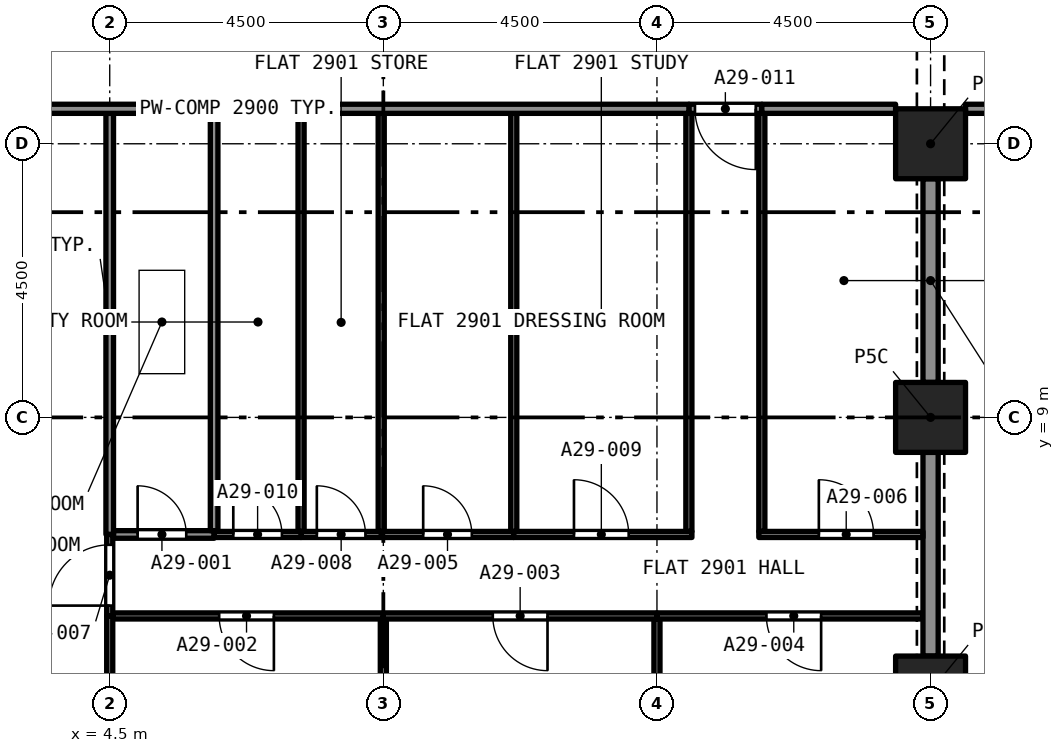
"""IFC4 building model, lengths in metres.
Left out: names, types, materials, properties, quantities, classifications, styles, units other than length and angle.
Written with IfcOpenShell. Run it as: python <this file> out.ifc"""

import sys

from ifc_helpers import new_model, si_unit, direction, frame, frame_2d, origin, origin_2d, place, context, subcontext, project, spatial, rectangle, extrude, element, fill, save


model = new_model("IFC4")
c1 = context("Model", 3, precision=1e-05, world=origin(), true_north=direction((0.0, 1.0)))
c2 = subcontext(c1, "Body", "Model", "MODEL_VIEW")
j1 = project(units=[si_unit("LENGTHUNIT", "METRE"), si_unit("PLANEANGLEUNIT", "RADIAN")], contexts=[c1])
p1 = place(None, origin())
s1 = spatial("IfcSite", under=j1, at=p1, CompositionType="ELEMENT")
p2 = place(p1, origin())
s2 = spatial("IfcBuilding", under=s1, at=p2, CompositionType="ELEMENT")
p3 = place(p2, frame((0.0, 0.0, 105.6)))
s3 = spatial("IfcBuildingStorey", under=s2, at=p3, CompositionType="ELEMENT", Elevation=105.6)
for number, where, z_axis, x_axis in (
    (1, (18.0, 4.5, 0.0), (0.0, 0.0, 1.0), (1.0, 0.0, 0.0)),
    (2, (18.0, 9.0, 0.0), (0.0, 0.0, 1.0), (1.0, 0.0, 0.0)),
    (3, (18.0, 13.5, 0.0), (0.0, 0.0, 1.0), (1.0, 0.0, 0.0)),
):
    element("IfcColumn", number, at=place(p3, frame(where, z_axis=z_axis, x_axis=x_axis)), inside=s3, PredefinedType="COLUMN", context=c2, shape_type="SweptSolid", body=[
        extrude(rectangle(XDim=1.15, YDim=1.15, at=origin_2d()), origin(), (0.0, 0.0, 1.0), 3.2),
    ])
p4 = place(p3, frame((4.562, 7.075, 0.0), z_axis=(0.0, 0.0, 1.0), x_axis=(1.0, 0.0, 0.0)))
e4 = element("IfcWall", 4, at=p4, inside=s3, PredefinedType="PARTITIONING", context=c2, shape_type="SweptSolid", body=[
    extrude(rectangle(XDim=1.655, YDim=0.125, at=frame_2d((0.827, 0.0))), origin(), (0.0, 0.0, 1.0), 2.9),
])
p5 = place(p4, frame((0.396, 0.0, 0.0)))
e5 = element("IfcOpeningElement", 5, at=p5, cuts=e4, PredefinedType="OPENING", context=c2, shape_type="SweptSolid", body=[
    extrude(rectangle(XDim=0.8, YDim=2.1, at=frame_2d((0.4, 1.05))), frame((0.0, 0.073, 0.0), z_axis=(0.0, -1.0, 0.0), x_axis=(1.0, 0.0, 0.0)), (0.0, 0.0, 1.0), 0.145),
])
p6 = place(p3, frame((4.5, 7.075, 0.0), z_axis=(0.0, 0.0, 1.0), x_axis=(0.0, 1.0, 0.0)))
e6 = element("IfcWall", 6, at=p6, inside=s3, PredefinedType="PARTITIONING", context=c2, shape_type="SweptSolid", body=[
    extrude(rectangle(XDim=6.925, YDim=0.125, at=frame_2d((3.462, 0.0))), origin(), (0.0, 0.0, 1.0), 2.9),
])
p7 = place(p3, frame((6.217, 7.137, 0.0), z_axis=(0.0, 0.0, 1.0), x_axis=(0.0, 1.0, 0.0)))
e7 = element("IfcWall", 7, at=p7, inside=s3, PredefinedType="PARTITIONING", context=c2, shape_type="SweptSolid", body=[
    extrude(rectangle(XDim=6.863, YDim=0.125, at=frame_2d((3.431, 0.0))), origin(), (0.0, 0.0, 1.0), 2.9),
])
p8 = place(p3, frame((9.0, 0.575, 0.0), z_axis=(0.0, 0.0, 1.0), x_axis=(0.0, 1.0, 0.0)))
e8 = element("IfcWall", 8, at=p8, inside=s3, PredefinedType="PARTITIONING", context=c2, shape_type="SweptSolid", body=[
    extrude(rectangle(XDim=5.11, YDim=0.1, at=frame_2d((2.555, 0.0))), origin(), (0.0, 0.0, 1.0), 2.9),
])
p9 = place(p3, frame((9.0, 5.735, 0.0), z_axis=(0.0, 0.0, 1.0), x_axis=(-1.0, 0.0, 0.0)))
e9 = element("IfcWall", 9, at=p9, inside=s3, PredefinedType="PARTITIONING", context=c2, shape_type="SweptSolid", body=[
    extrude(rectangle(XDim=4.45, YDim=0.1, at=frame_2d((2.225, 0.0))), origin(), (0.0, 0.0, 1.0), 2.9),
])
p10 = place(p9, frame((1.8, 0.0, 0.0)))
e10 = element("IfcOpeningElement", 10, at=p10, cuts=e9, PredefinedType="OPENING", context=c2, shape_type="SweptSolid", body=[
    extrude(rectangle(XDim=0.9, YDim=2.1, at=frame_2d((0.45, 1.05))), frame((0.0, 0.06, 0.0), z_axis=(0.0, -1.0, 0.0), x_axis=(1.0, 0.0, 0.0)), (0.0, 0.0, 1.0), 0.12),
])
p11 = place(p3, frame((4.5, 0.622, 0.0), z_axis=(0.0, 0.0, 1.0), x_axis=(0.0, 1.0, 0.0)))
e11 = element("IfcWall", 11, at=p11, inside=s3, PredefinedType="PARTITIONING", context=c2, shape_type="SweptSolid", body=[
    extrude(rectangle(XDim=5.113, YDim=0.1, at=frame_2d((2.556, 0.0))), origin(), (0.0, 0.0, 1.0), 2.9),
])
p12 = place(p3, frame((13.5, 0.575, 0.0), z_axis=(0.0, 0.0, 1.0), x_axis=(0.0, 1.0, 0.0)))
e12 = element("IfcWall", 12, at=p12, inside=s3, PredefinedType="PARTITIONING", context=c2, shape_type="SweptSolid", body=[
    extrude(rectangle(XDim=5.11, YDim=0.1, at=frame_2d((2.555, 0.0))), origin(), (0.0, 0.0, 1.0), 2.9),
])
p13 = place(p3, frame((13.5, 5.735, 0.0), z_axis=(0.0, 0.0, 1.0), x_axis=(-1.0, 0.0, 0.0)))
e13 = element("IfcWall", 13, at=p13, inside=s3, PredefinedType="PARTITIONING", context=c2, shape_type="SweptSolid", body=[
    extrude(rectangle(XDim=4.5, YDim=0.1, at=frame_2d((2.25, 0.0))), origin(), (0.0, 0.0, 1.0), 2.9),
])
p14 = place(p13, frame((1.8, 0.0, 0.0)))
e14 = element("IfcOpeningElement", 14, at=p14, cuts=e13, PredefinedType="OPENING", context=c2, shape_type="SweptSolid", body=[
    extrude(rectangle(XDim=0.9, YDim=2.1, at=frame_2d((0.45, 1.05))), frame((0.0, 0.06, 0.0), z_axis=(0.0, -1.0, 0.0), x_axis=(1.0, 0.0, 0.0)), (0.0, 0.0, 1.0), 0.12),
])
p15 = place(p3, frame((17.875, 5.735, 0.0), z_axis=(0.0, 0.0, 1.0), x_axis=(-1.0, 0.0, 0.0)))
e15 = element("IfcWall", 15, at=p15, inside=s3, PredefinedType="PARTITIONING", context=c2, shape_type="SweptSolid", body=[
    extrude(rectangle(XDim=4.375, YDim=0.1, at=frame_2d((2.188, 0.0))), origin(), (0.0, 0.0, 1.0), 2.9),
])
p16 = place(p15, frame((1.675, 0.0, 0.0)))
e16 = element("IfcOpeningElement", 16, at=p16, cuts=e15, PredefinedType="OPENING", context=c2, shape_type="SweptSolid", body=[
    extrude(rectangle(XDim=0.9, YDim=2.1, at=frame_2d((0.45, 1.05))), frame((0.0, 0.06, 0.0), z_axis=(0.0, -1.0, 0.0), x_axis=(1.0, 0.0, 0.0)), (0.0, 0.0, 1.0), 0.12),
])
p17 = place(p3, frame((18.0, 5.075, 0.0), z_axis=(0.0, 0.0, 1.0), x_axis=(0.0, 1.0, 0.0)))
e17 = element("IfcWall", 17, at=p17, inside=s3, PredefinedType="PARTITIONING", context=c2, shape_type="SweptSolid", body=[
    extrude(rectangle(XDim=3.35, YDim=0.25, at=frame_2d((1.675, 0.0))), origin(), (0.0, 0.0, 1.0), 2.38),
])
p18 = place(p3, frame((8.965, 7.075, 0.0), z_axis=(0.0, 0.0, 1.0), x_axis=(1.0, 0.0, 0.0)))
e18 = element("IfcWall", 18, at=p18, inside=s3, PredefinedType="PARTITIONING", context=c2, shape_type="SweptSolid", body=[
    extrude(rectangle(XDim=2.18, YDim=0.1, at=frame_2d((1.09, 0.0))), origin(), (0.0, 0.0, 1.0), 2.9),
])
p19 = place(p18, frame((0.69, 0.0, 0.0)))
e19 = element("IfcOpeningElement", 19, at=p19, cuts=e18, PredefinedType="OPENING", context=c2, shape_type="SweptSolid", body=[
    extrude(rectangle(XDim=0.8, YDim=2.1, at=frame_2d((0.4, 1.05))), frame((0.0, 0.06, 0.0), z_axis=(0.0, -1.0, 0.0), x_axis=(1.0, 0.0, 0.0)), (0.0, 0.0, 1.0), 0.12),
])
for number, where, z_axis, x_axis in (
    (20, (8.965, 7.125, 0.0), (0.0, 0.0, 1.0), (0.0, 1.0, 0.0)),
    (21, (11.145, 7.125, 0.0), (0.0, 0.0, 1.0), (0.0, 1.0, 0.0)),
    (22, (15.225, 7.125, 0.0), (0.0, 0.0, 1.0), (0.0, 1.0, 0.0)),
):
    element("IfcWall", number, at=place(p3, frame(where, z_axis=z_axis, x_axis=x_axis)), inside=s3, PredefinedType="PARTITIONING", context=c2, shape_type="SweptSolid", body=[
        extrude(rectangle(XDim=6.875, YDim=0.1, at=frame_2d((3.438, 0.0))), origin(), (0.0, 0.0, 1.0), 2.9),
    ])
p20 = place(p3, frame((15.175, 7.075, 0.0), z_axis=(0.0, 0.0, 1.0), x_axis=(1.0, 0.0, 0.0)))
e23 = element("IfcWall", 23, at=p20, inside=s3, PredefinedType="PARTITIONING", context=c2, shape_type="SweptSolid", body=[
    extrude(rectangle(XDim=2.7, YDim=0.1, at=frame_2d((1.35, 0.0))), origin(), (0.0, 0.0, 1.0), 2.9),
])
p21 = place(p20, frame((0.988, 0.0, 0.0)))
e24 = element("IfcOpeningElement", 24, at=p21, cuts=e23, PredefinedType="OPENING", context=c2, shape_type="SweptSolid", body=[
    extrude(rectangle(XDim=0.9, YDim=2.1, at=frame_2d((0.45, 1.05))), frame((0.0, 0.06, 0.0), z_axis=(0.0, -1.0, 0.0), x_axis=(1.0, 0.0, 0.0)), (0.0, 0.0, 1.0), 0.12),
])
p22 = place(p3, frame((4.5, 5.735, 0.0), z_axis=(0.0, 0.0, 1.0), x_axis=(0.0, 1.0, 0.0)))
e25 = element("IfcWall", 25, at=p22, inside=s3, PredefinedType="PARTITIONING", context=c2, shape_type="SweptSolid", body=[
    extrude(rectangle(XDim=1.34, YDim=0.1, at=frame_2d((0.67, 0.0))), origin(), (0.0, 0.0, 1.0), 2.9),
])
p23 = place(p22, frame((0.17, 0.0, 0.0)))
e26 = element("IfcOpeningElement", 26, at=p23, cuts=e25, PredefinedType="OPENING", context=c2, shape_type="SweptSolid", body=[
    extrude(rectangle(XDim=1.0, YDim=2.1, at=frame_2d((0.5, 1.05))), frame((0.0, 0.06, 0.0), z_axis=(0.0, -1.0, 0.0), x_axis=(1.0, 0.0, 0.0)), (0.0, 0.0, 1.0), 0.12),
])
p24 = place(p3, frame((7.647, 7.075, 0.0), z_axis=(0.0, 0.0, 1.0), x_axis=(1.0, 0.0, 0.0)))
e27 = element("IfcWall", 27, at=p24, inside=s3, PredefinedType="PARTITIONING", context=c2, shape_type="SweptSolid", body=[
    extrude(rectangle(XDim=1.318, YDim=0.1, at=frame_2d((0.659, 0.0))), origin(), (0.0, 0.0, 1.0), 2.9),
])
p25 = place(p24, frame((0.259, 0.0, 0.0)))
e28 = element("IfcOpeningElement", 28, at=p25, cuts=e27, PredefinedType="OPENING", context=c2, shape_type="SweptSolid", body=[
    extrude(rectangle(XDim=0.8, YDim=2.1, at=frame_2d((0.4, 1.05))), frame((0.0, 0.06, 0.0), z_axis=(0.0, -1.0, 0.0), x_axis=(1.0, 0.0, 0.0)), (0.0, 0.0, 1.0), 0.12),
])
p26 = place(p3, frame((11.145, 7.075, 0.0), z_axis=(0.0, 0.0, 1.0), x_axis=(1.0, 0.0, 0.0)))
e29 = element("IfcWall", 29, at=p26, inside=s3, PredefinedType="PARTITIONING", context=c2, shape_type="SweptSolid", body=[
    extrude(rectangle(XDim=2.93, YDim=0.1, at=frame_2d((1.465, 0.0))), origin(), (0.0, 0.0, 1.0), 2.9),
])
p27 = place(p26, frame((0.99, 0.0, 0.0)))
e30 = element("IfcOpeningElement", 30, at=p27, cuts=e29, PredefinedType="OPENING", context=c2, shape_type="SweptSolid", body=[
    extrude(rectangle(XDim=0.9, YDim=2.1, at=frame_2d((0.45, 1.05))), frame((0.0, 0.06, 0.0), z_axis=(0.0, -1.0, 0.0), x_axis=(1.0, 0.0, 0.0)), (0.0, 0.0, 1.0), 0.12),
])
p28 = place(p3, frame((14.025, 7.125, 0.0), z_axis=(0.0, 0.0, 1.0), x_axis=(0.0, 1.0, 0.0)))
e31 = element("IfcWall", 31, at=p28, inside=s3, PredefinedType="PARTITIONING", context=c2, shape_type="SweptSolid", body=[
    extrude(rectangle(XDim=6.875, YDim=0.1, at=frame_2d((3.438, 0.0))), origin(), (0.0, 0.0, 1.0), 2.9),
])
p29 = place(p3, frame((6.217, 7.075, 0.0), z_axis=(0.0, 0.0, 1.0), x_axis=(1.0, 0.0, 0.0)))
e32 = element("IfcWall", 32, at=p29, inside=s3, PredefinedType="PARTITIONING", context=c2, shape_type="SweptSolid", body=[
    extrude(rectangle(XDim=1.43, YDim=0.1, at=frame_2d((0.715, 0.0))), origin(), (0.0, 0.0, 1.0), 2.9),
])
p30 = place(p29, frame((0.315, 0.0, 0.0)))
e33 = element("IfcOpeningElement", 33, at=p30, cuts=e32, PredefinedType="OPENING", context=c2, shape_type="SweptSolid", body=[
    extrude(rectangle(XDim=0.8, YDim=2.1, at=frame_2d((0.4, 1.05))), frame((0.0, 0.06, 0.0), z_axis=(0.0, -1.0, 0.0), x_axis=(1.0, 0.0, 0.0)), (0.0, 0.0, 1.0), 0.12),
])
p31 = place(p3, frame((15.225, 14.075, 0.0), z_axis=(0.0, 0.0, 1.0), x_axis=(-1.0, 0.0, 0.0)))
e34 = element("IfcWall", 34, at=p31, inside=s3, PredefinedType="PARTITIONING", context=c2, shape_type="SweptSolid", body=[
    extrude(rectangle(XDim=1.2, YDim=0.15, at=frame_2d((0.6, 0.0))), origin(), (0.0, 0.0, 1.0), 2.9),
])
p32 = place(p31, frame((0.1, 0.0, 0.0)))
e35 = element("IfcOpeningElement", 35, at=p32, cuts=e34, PredefinedType="OPENING", context=c2, shape_type="SweptSolid", body=[
    extrude(rectangle(XDim=1.0, YDim=2.1, at=frame_2d((0.5, 1.05))), frame((0.0, 0.085, 0.0), z_axis=(0.0, -1.0, 0.0), x_axis=(1.0, 0.0, 0.0)), (0.0, 0.0, 1.0), 0.17),
])
p33 = place(p3, frame((18.0, 9.575, 0.0), z_axis=(0.0, 0.0, 1.0), x_axis=(0.0, 1.0, 0.0)))
e36 = element("IfcWall", 36, at=p33, inside=s3, PredefinedType="PARTITIONING", context=c2, shape_type="SweptSolid", body=[
    extrude(rectangle(XDim=3.35, YDim=0.25, at=frame_2d((1.675, 0.0))), origin(), (0.0, 0.0, 1.0), 2.38),
])
p34 = place(p3, frame((15.225, 14.075, 0.0), z_axis=(0.0, 0.0, 1.0), x_axis=(1.0, 0.0, 0.0)))
e37 = element("IfcWall", 37, at=p34, inside=s3, PredefinedType="PARTITIONING", context=c2, shape_type="SweptSolid", body=[
    extrude(rectangle(XDim=2.2, YDim=0.15, at=frame_2d((1.1, 0.0))), origin(), (0.0, 0.0, 1.0), 2.9),
])
p35 = place(p3, frame((0.575, 14.075, 0.0), z_axis=(0.0, 0.0, 1.0), x_axis=(1.0, 0.0, 0.0)))
e38 = element("IfcWall", 38, at=p35, inside=s3, PredefinedType="PARTITIONING", context=c2, shape_type="SweptSolid", body=[
    extrude(rectangle(XDim=13.45, YDim=0.15, at=frame_2d((6.725, 0.0))), origin(), (0.0, 0.0, 1.0), 2.9),
])
p36 = place(p3, frame((7.647, 7.125, 0.0), z_axis=(0.0, 0.0, 1.0), x_axis=(0.0, 1.0, 0.0)))
e39 = element("IfcWall", 39, at=p36, inside=s3, PredefinedType="PARTITIONING", context=c2, shape_type="SweptSolid", body=[
    extrude(rectangle(XDim=6.875, YDim=0.1, at=frame_2d((3.438, 0.0))), origin(), (0.0, 0.0, 1.0), 2.9),
])
p37 = place(p3, frame((27.0, 14.075, 0.0), z_axis=(0.0, 0.0, 1.0), x_axis=(-1.0, 0.0, 0.0)))
e40 = element("IfcWall", 40, at=p37, inside=s3, PredefinedType="PARTITIONING", context=c2, shape_type="SweptSolid", body=[
    extrude(rectangle(XDim=8.425, YDim=0.15, at=frame_2d((4.212, 0.0))), origin(), (0.0, 0.0, 1.0), 2.75),
])
p38 = place(p37, frame((4.0, 0.0, 0.0)))
e41 = element("IfcOpeningElement", 41, at=p38, cuts=e40, PredefinedType="OPENING", context=c2, shape_type="SweptSolid", body=[
    extrude(rectangle(XDim=1.0, YDim=2.1, at=frame_2d((0.5, 1.05))), frame((0.0, 0.085, 0.0), z_axis=(0.0, -1.0, 0.0), x_axis=(1.0, 0.0, 0.0)), (0.0, 0.0, 1.0), 0.17),
])
p39 = place(p5, origin())
e42 = element("IfcDoor", 42, at=p39, inside=s3, OperationType="SINGLE_SWING_LEFT", PredefinedType="DOOR", context=c2, shape_type="SweptSolid", body=[
    extrude(rectangle(XDim=0.8, YDim=2.1, at=frame_2d((0.4, 1.05))), frame((0.0, 0.025, 0.0), z_axis=(0.0, -1.0, 0.0), x_axis=(1.0, 0.0, 0.0)), (0.0, 0.0, 1.0), 0.05),
])
fill(e5, e42)
p40 = place(p10, origin())
e43 = element("IfcDoor", 43, at=p40, inside=s3, OperationType="SINGLE_SWING_RIGHT", PredefinedType="DOOR", context=c2, shape_type="SweptSolid", body=[
    extrude(rectangle(XDim=0.9, YDim=2.1, at=frame_2d((0.45, 1.05))), frame((0.0, 0.025, 0.0), z_axis=(0.0, -1.0, 0.0), x_axis=(1.0, 0.0, 0.0)), (0.0, 0.0, 1.0), 0.05),
])
fill(e10, e43)
p41 = place(p14, origin())
e44 = element("IfcDoor", 44, at=p41, inside=s3, OperationType="SINGLE_SWING_LEFT", PredefinedType="DOOR", context=c2, shape_type="SweptSolid", body=[
    extrude(rectangle(XDim=0.9, YDim=2.1, at=frame_2d((0.45, 1.05))), frame((0.0, 0.025, 0.0), z_axis=(0.0, -1.0, 0.0), x_axis=(1.0, 0.0, 0.0)), (0.0, 0.0, 1.0), 0.05),
])
fill(e14, e44)
p42 = place(p16, origin())
e45 = element("IfcDoor", 45, at=p42, inside=s3, OperationType="SINGLE_SWING_LEFT", PredefinedType="DOOR", context=c2, shape_type="SweptSolid", body=[
    extrude(rectangle(XDim=0.9, YDim=2.1, at=frame_2d((0.45, 1.05))), frame((0.0, 0.025, 0.0), z_axis=(0.0, -1.0, 0.0), x_axis=(1.0, 0.0, 0.0)), (0.0, 0.0, 1.0), 0.05),
])
fill(e16, e45)
p43 = place(p19, origin())
e46 = element("IfcDoor", 46, at=p43, inside=s3, OperationType="SINGLE_SWING_RIGHT", PredefinedType="DOOR", context=c2, shape_type="SweptSolid", body=[
    extrude(rectangle(XDim=0.8, YDim=2.1, at=frame_2d((0.4, 1.05))), frame((0.0, 0.025, 0.0), z_axis=(0.0, -1.0, 0.0), x_axis=(1.0, 0.0, 0.0)), (0.0, 0.0, 1.0), 0.05),
])
fill(e19, e46)
p44 = place(p21, origin())
e47 = element("IfcDoor", 47, at=p44, inside=s3, OperationType="SINGLE_SWING_RIGHT", PredefinedType="DOOR", context=c2, shape_type="SweptSolid", body=[
    extrude(rectangle(XDim=0.9, YDim=2.1, at=frame_2d((0.45, 1.05))), frame((0.0, 0.025, 0.0), z_axis=(0.0, -1.0, 0.0), x_axis=(1.0, 0.0, 0.0)), (0.0, 0.0, 1.0), 0.05),
])
fill(e24, e47)
p45 = place(p23, origin())
e48 = element("IfcDoor", 48, at=p45, inside=s3, OperationType="SINGLE_SWING_RIGHT", PredefinedType="DOOR", context=c2, shape_type="SweptSolid", body=[
    extrude(rectangle(XDim=1.0, YDim=2.1, at=frame_2d((0.5, 1.05))), frame((0.0, 0.025, 0.0), z_axis=(0.0, -1.0, 0.0), x_axis=(1.0, 0.0, 0.0)), (0.0, 0.0, 1.0), 0.05),
])
fill(e26, e48)
p46 = place(p25, origin())
e49 = element("IfcDoor", 49, at=p46, inside=s3, OperationType="SINGLE_SWING_RIGHT", PredefinedType="DOOR", context=c2, shape_type="SweptSolid", body=[
    extrude(rectangle(XDim=0.8, YDim=2.1, at=frame_2d((0.4, 1.05))), frame((0.0, 0.025, 0.0), z_axis=(0.0, -1.0, 0.0), x_axis=(1.0, 0.0, 0.0)), (0.0, 0.0, 1.0), 0.05),
])
fill(e28, e49)
p47 = place(p27, origin())
e50 = element("IfcDoor", 50, at=p47, inside=s3, OperationType="SINGLE_SWING_LEFT", PredefinedType="DOOR", context=c2, shape_type="SweptSolid", body=[
    extrude(rectangle(XDim=0.9, YDim=2.1, at=frame_2d((0.45, 1.05))), frame((0.0, 0.025, 0.0), z_axis=(0.0, -1.0, 0.0), x_axis=(1.0, 0.0, 0.0)), (0.0, 0.0, 1.0), 0.05),
])
fill(e30, e50)
p48 = place(p30, origin())
e51 = element("IfcDoor", 51, at=p48, inside=s3, OperationType="SINGLE_SWING_RIGHT", PredefinedType="DOOR", context=c2, shape_type="SweptSolid", body=[
    extrude(rectangle(XDim=0.8, YDim=2.1, at=frame_2d((0.4, 1.05))), frame((0.0, 0.025, 0.0), z_axis=(0.0, -1.0, 0.0), x_axis=(1.0, 0.0, 0.0)), (0.0, 0.0, 1.0), 0.05),
])
fill(e33, e51)
p49 = place(p32, origin())
e52 = element("IfcDoor", 52, at=p49, inside=s3, OperationType="SINGLE_SWING_RIGHT", PredefinedType="DOOR", context=c2, shape_type="SweptSolid", body=[
    extrude(rectangle(XDim=1.0, YDim=2.1, at=frame_2d((0.5, 1.05))), frame((0.0, 0.025, 0.0), z_axis=(0.0, -1.0, 0.0), x_axis=(1.0, 0.0, 0.0)), (0.0, 0.0, 1.0), 0.05),
])
fill(e35, e52)
save(model, sys.argv[1])
